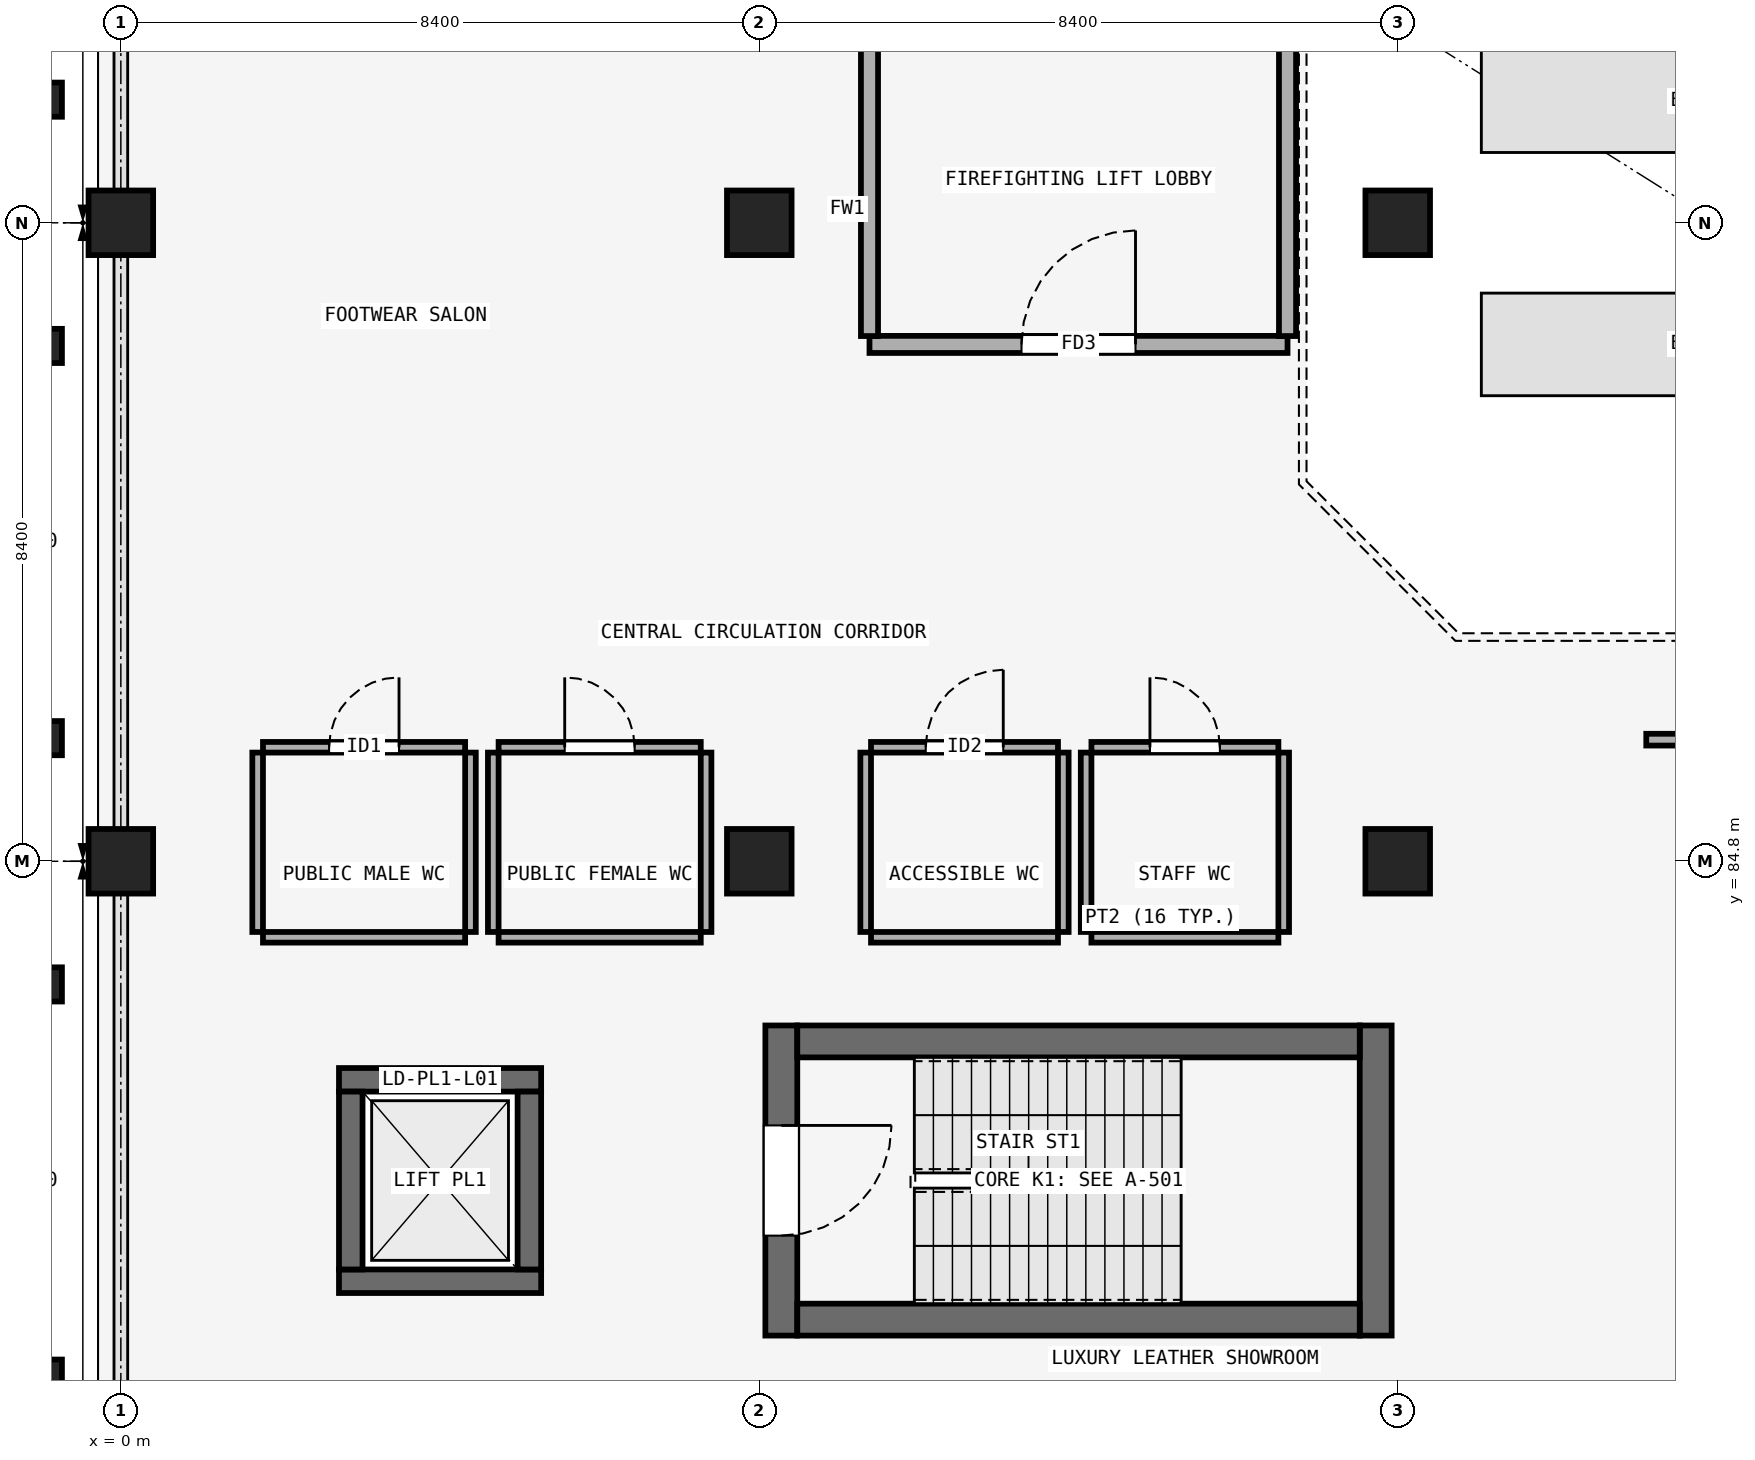
"""IFC4 building model, lengths in metres.
Left out: names, types, materials, properties, quantities, classifications, styles, units other than length and angle.
Written with IfcOpenShell. Run it as: python <this file> out.ifc"""

import sys

from ifc_helpers import new_model, si_unit, direction, frame, frame_2d, origin, origin_2d, place, context, subcontext, project, spatial, rectangle, extrude, element, fill, save


model = new_model("IFC4")
c1 = context("Model", 3, precision=1e-05, world=origin(), true_north=direction((0.0, 1.0)))
c2 = subcontext(c1, "Body", "Model", "MODEL_VIEW")
j1 = project(units=[si_unit("LENGTHUNIT", "METRE"), si_unit("PLANEANGLEUNIT", "RADIAN")], contexts=[c1])
p1 = place(None, origin())
s1 = spatial("IfcSite", under=j1, at=p1, CompositionType="ELEMENT")
p2 = place(p1, origin())
s2 = spatial("IfcBuilding", under=s1, at=p2, CompositionType="ELEMENT")
p3 = place(p2, frame((0.0, 0.0, 5.4)))
s3 = spatial("IfcBuildingStorey", under=s2, at=p3, CompositionType="ELEMENT", Elevation=5.4)
for number, where, z_axis, x_axis in (
    (1, (0.0, 84.8, 0.0), (0.0, 0.0, 1.0), (1.0, 0.0, 0.0)),
    (2, (8.4, 84.8, 0.0), (0.0, 0.0, 1.0), (1.0, 0.0, 0.0)),
    (3, (16.8, 84.8, 0.0), (0.0, 0.0, 1.0), (1.0, 0.0, 0.0)),
    (4, (0.0, 93.2, 0.0), (0.0, 0.0, 1.0), (1.0, 0.0, 0.0)),
    (5, (8.4, 93.2, 0.0), (0.0, 0.0, 1.0), (1.0, 0.0, 0.0)),
    (6, (16.8, 93.2, 0.0), (0.0, 0.0, 1.0), (1.0, 0.0, 0.0)),
):
    element("IfcColumn", number, at=place(p3, frame(where, z_axis=z_axis, x_axis=x_axis)), inside=s3, PredefinedType="COLUMN", context=c2, shape_type="SweptSolid", body=[
        extrude(rectangle(XDim=0.85, YDim=0.85, at=origin_2d()), origin(), (0.0, 0.0, 1.0), 4.5),
    ])
for number, where, z_axis, x_axis in (
    (7, (-1.05, 78.02, 0.0), (0.0, 0.0, 1.0), (0.0, 1.0, 0.0)),
    (8, (-1.05, 83.18, 0.0), (0.0, 0.0, 1.0), (0.0, 1.0, 0.0)),
    (9, (-1.05, 86.42, 0.0), (0.0, 0.0, 1.0), (0.0, 1.0, 0.0)),
    (10, (-1.05, 91.58, 0.0), (0.0, 0.0, 1.0), (0.0, 1.0, 0.0)),
    (11, (-1.05, 94.82, 0.0), (0.0, 0.0, 1.0), (0.0, 1.0, 0.0)),
):
    element("IfcColumn", number, at=place(p3, frame(where, z_axis=z_axis, x_axis=x_axis)), inside=s3, PredefinedType="PILASTER", context=c2, shape_type="SweptSolid", body=[
        extrude(rectangle(XDim=0.45, YDim=0.55, at=origin_2d()), origin(), (0.0, 0.0, 1.0), 4.5),
    ])
p4 = place(p3, frame((8.69, 82.64, 0.0), z_axis=(0.0, 0.0, 1.0), x_axis=(0.0, -1.0, 0.0)))
e12 = element("IfcWall", 12, at=p4, inside=s3, PredefinedType="SHEAR", context=c2, shape_type="SweptSolid", body=[
    extrude(rectangle(XDim=4.08, YDim=0.42, at=frame_2d((2.04, 0.0))), origin(), (0.0, 0.0, 1.0), 4.2),
])
p5 = place(p4, frame((1.315, 0.0, 0.0)))
e13 = element("IfcOpeningElement", 13, at=p5, cuts=e12, PredefinedType="OPENING", context=c2, shape_type="SweptSolid", body=[
    extrude(rectangle(XDim=1.45, YDim=2.2, at=frame_2d((0.725, 1.1))), frame((0.0, 0.22, 0.0), z_axis=(0.0, -1.0, 0.0), x_axis=(1.0, 0.0, 0.0)), (0.0, 0.0, 1.0), 0.44),
])
p6 = place(p3, frame((16.51, 78.56, 0.0), z_axis=(0.0, 0.0, 1.0), x_axis=(0.0, 1.0, 0.0)))
e14 = element("IfcWall", 14, at=p6, inside=s3, PredefinedType="SHEAR", context=c2, shape_type="SweptSolid", body=[
    extrude(rectangle(XDim=4.08, YDim=0.42, at=frame_2d((2.04, 0.0))), origin(), (0.0, 0.0, 1.0), 4.2),
])
for number, where, z_axis, x_axis in (
    (15, (8.9, 78.77, 0.0), (0.0, 0.0, 1.0), (1.0, 0.0, 0.0)),
    (16, (8.9, 82.43, 0.0), (0.0, 0.0, 1.0), (1.0, 0.0, 0.0)),
):
    element("IfcWall", number, at=place(p3, frame(where, z_axis=z_axis, x_axis=x_axis)), inside=s3, PredefinedType="SHEAR", context=c2, shape_type="SweptSolid", body=[
        extrude(rectangle(XDim=7.4, YDim=0.42, at=frame_2d((3.7, 0.0))), origin(), (0.0, 0.0, 1.0), 4.2),
    ])
p7 = place(p3, frame((2.87, 79.275, 0.0), z_axis=(0.0, 0.0, 1.0), x_axis=(1.0, 0.0, 0.0)))
e17 = element("IfcWall", 17, at=p7, inside=s3, PredefinedType="SHEAR", context=c2, shape_type="SweptSolid", body=[
    extrude(rectangle(XDim=2.66, YDim=0.31, at=frame_2d((1.33, 0.0))), origin(), (0.0, 0.0, 1.0), 4.2),
])
p8 = place(p3, frame((2.87, 81.925, 0.0), z_axis=(0.0, 0.0, 1.0), x_axis=(1.0, 0.0, 0.0)))
e18 = element("IfcWall", 18, at=p8, inside=s3, PredefinedType="SHEAR", context=c2, shape_type="SweptSolid", body=[
    extrude(rectangle(XDim=2.66, YDim=0.31, at=frame_2d((1.33, 0.0))), origin(), (0.0, 0.0, 1.0), 4.2),
])
p9 = place(p8, frame((0.78, 0.0, 0.0)))
e19 = element("IfcOpeningElement", 19, at=p9, cuts=e18, PredefinedType="OPENING", context=c2, shape_type="SweptSolid", body=[
    extrude(rectangle(XDim=1.1, YDim=2.2, at=frame_2d((0.55, 1.1))), frame((0.0, 0.165, 0.0), z_axis=(0.0, -1.0, 0.0), x_axis=(1.0, 0.0, 0.0)), (0.0, 0.0, 1.0), 0.33),
])
for number, where, z_axis, x_axis in (
    (20, (3.025, 79.43, 0.0), (0.0, 0.0, 1.0), (0.0, 1.0, 0.0)),
    (21, (5.375, 79.43, 0.0), (0.0, 0.0, 1.0), (0.0, 1.0, 0.0)),
):
    element("IfcWall", number, at=place(p3, frame(where, z_axis=z_axis, x_axis=x_axis)), inside=s3, PredefinedType="SHEAR", context=c2, shape_type="SweptSolid", body=[
        extrude(rectangle(XDim=2.34, YDim=0.31, at=frame_2d((1.17, 0.0))), origin(), (0.0, 0.0, 1.0), 4.2),
    ])
p10 = place(p3, frame((9.85, 91.6, 0.0), z_axis=(0.0, 0.0, 1.0), x_axis=(1.0, 0.0, 0.0)))
e22 = element("IfcWall", 22, at=p10, inside=s3, PredefinedType="PARTITIONING", context=c2, shape_type="SweptSolid", body=[
    extrude(rectangle(XDim=5.5, YDim=0.225, at=frame_2d((2.75, 0.0))), origin(), (0.0, 0.0, 1.0), 4.2),
])
p11 = place(p10, frame((2.0, 0.0, 0.0)))
e23 = element("IfcOpeningElement", 23, at=p11, cuts=e22, PredefinedType="OPENING", context=c2, shape_type="SweptSolid", body=[
    extrude(rectangle(XDim=1.5, YDim=2.25, at=frame_2d((0.75, 1.125))), frame((0.0, 0.123, 0.0), z_axis=(0.0, -1.0, 0.0), x_axis=(1.0, 0.0, 0.0)), (0.0, 0.0, 1.0), 0.245),
])
for number, where, z_axis, x_axis in (
    (24, (9.85, 91.71, 0.0), (0.0, 0.0, 1.0), (0.0, 1.0, 0.0)),
    (25, (15.35, 91.71, 0.0), (0.0, 0.0, 1.0), (0.0, 1.0, 0.0)),
):
    element("IfcWall", number, at=place(p3, frame(where, z_axis=z_axis, x_axis=x_axis)), inside=s3, PredefinedType="PARTITIONING", context=c2, shape_type="SweptSolid", body=[
        extrude(rectangle(XDim=4.53, YDim=0.225, at=frame_2d((2.265, 0.0))), origin(), (0.0, 0.0, 1.0), 3.5),
    ])
p12 = place(p3, frame((1.87, 86.3, 0.0), z_axis=(0.0, 0.0, 1.0), x_axis=(1.0, 0.0, 0.0)))
e26 = element("IfcWall", 26, at=p12, inside=s3, PredefinedType="PARTITIONING", context=c2, shape_type="SweptSolid", body=[
    extrude(rectangle(XDim=2.66, YDim=0.14, at=frame_2d((1.33, 0.0))), origin(), (0.0, 0.0, 1.0), 4.2),
])
p13 = place(p12, frame((0.87, 0.0, 0.0)))
e27 = element("IfcOpeningElement", 27, at=p13, cuts=e26, PredefinedType="OPENING", context=c2, shape_type="SweptSolid", body=[
    extrude(rectangle(XDim=0.92, YDim=2.12, at=frame_2d((0.46, 1.06))), frame((0.0, 0.08, 0.0), z_axis=(0.0, -1.0, 0.0), x_axis=(1.0, 0.0, 0.0)), (0.0, 0.0, 1.0), 0.16),
])
p14 = place(p3, frame((1.87, 83.8, 0.0), z_axis=(0.0, 0.0, 1.0), x_axis=(1.0, 0.0, 0.0)))
e28 = element("IfcWall", 28, at=p14, inside=s3, PredefinedType="PARTITIONING", context=c2, shape_type="SweptSolid", body=[
    extrude(rectangle(XDim=2.66, YDim=0.14, at=frame_2d((1.33, 0.0))), origin(), (0.0, 0.0, 1.0), 4.2),
])
for number, where, z_axis, x_axis in (
    (29, (1.8, 83.87, 0.0), (0.0, 0.0, 1.0), (0.0, 1.0, 0.0)),
    (30, (4.6, 83.87, 0.0), (0.0, 0.0, 1.0), (0.0, 1.0, 0.0)),
):
    element("IfcWall", number, at=place(p3, frame(where, z_axis=z_axis, x_axis=x_axis)), inside=s3, PredefinedType="PARTITIONING", context=c2, shape_type="SweptSolid", body=[
        extrude(rectangle(XDim=2.36, YDim=0.14, at=frame_2d((1.18, 0.0))), origin(), (0.0, 0.0, 1.0), 3.45),
    ])
p15 = place(p3, frame((4.97, 86.3, 0.0), z_axis=(0.0, 0.0, 1.0), x_axis=(1.0, 0.0, 0.0)))
e31 = element("IfcWall", 31, at=p15, inside=s3, PredefinedType="PARTITIONING", context=c2, shape_type="SweptSolid", body=[
    extrude(rectangle(XDim=2.66, YDim=0.14, at=frame_2d((1.33, 0.0))), origin(), (0.0, 0.0, 1.0), 4.2),
])
p16 = place(p15, frame((0.87, 0.0, 0.0)))
e32 = element("IfcOpeningElement", 32, at=p16, cuts=e31, PredefinedType="OPENING", context=c2, shape_type="SweptSolid", body=[
    extrude(rectangle(XDim=0.92, YDim=2.12, at=frame_2d((0.46, 1.06))), frame((0.0, 0.08, 0.0), z_axis=(0.0, -1.0, 0.0), x_axis=(1.0, 0.0, 0.0)), (0.0, 0.0, 1.0), 0.16),
])
p17 = place(p3, frame((4.97, 83.8, 0.0), z_axis=(0.0, 0.0, 1.0), x_axis=(1.0, 0.0, 0.0)))
e33 = element("IfcWall", 33, at=p17, inside=s3, PredefinedType="PARTITIONING", context=c2, shape_type="SweptSolid", body=[
    extrude(rectangle(XDim=2.66, YDim=0.14, at=frame_2d((1.33, 0.0))), origin(), (0.0, 0.0, 1.0), 4.2),
])
for number, where, z_axis, x_axis in (
    (34, (4.9, 83.87, 0.0), (0.0, 0.0, 1.0), (0.0, 1.0, 0.0)),
    (35, (7.7, 83.87, 0.0), (0.0, 0.0, 1.0), (0.0, 1.0, 0.0)),
):
    element("IfcWall", number, at=place(p3, frame(where, z_axis=z_axis, x_axis=x_axis)), inside=s3, PredefinedType="PARTITIONING", context=c2, shape_type="SweptSolid", body=[
        extrude(rectangle(XDim=2.36, YDim=0.14, at=frame_2d((1.18, 0.0))), origin(), (0.0, 0.0, 1.0), 3.45),
    ])
p18 = place(p3, frame((9.87, 86.3, 0.0), z_axis=(0.0, 0.0, 1.0), x_axis=(1.0, 0.0, 0.0)))
e36 = element("IfcWall", 36, at=p18, inside=s3, PredefinedType="PARTITIONING", context=c2, shape_type="SweptSolid", body=[
    extrude(rectangle(XDim=2.46, YDim=0.14, at=frame_2d((1.23, 0.0))), origin(), (0.0, 0.0, 1.0), 4.2),
])
p19 = place(p18, frame((0.72, 0.0, 0.0)))
e37 = element("IfcOpeningElement", 37, at=p19, cuts=e36, PredefinedType="OPENING", context=c2, shape_type="SweptSolid", body=[
    extrude(rectangle(XDim=1.02, YDim=2.15, at=frame_2d((0.51, 1.075))), frame((0.0, 0.08, 0.0), z_axis=(0.0, -1.0, 0.0), x_axis=(1.0, 0.0, 0.0)), (0.0, 0.0, 1.0), 0.16),
])
p20 = place(p3, frame((9.87, 83.8, 0.0), z_axis=(0.0, 0.0, 1.0), x_axis=(1.0, 0.0, 0.0)))
e38 = element("IfcWall", 38, at=p20, inside=s3, PredefinedType="PARTITIONING", context=c2, shape_type="SweptSolid", body=[
    extrude(rectangle(XDim=2.46, YDim=0.14, at=frame_2d((1.23, 0.0))), origin(), (0.0, 0.0, 1.0), 4.2),
])
for number, where, z_axis, x_axis in (
    (39, (9.8, 83.87, 0.0), (0.0, 0.0, 1.0), (0.0, 1.0, 0.0)),
    (40, (12.4, 83.87, 0.0), (0.0, 0.0, 1.0), (0.0, 1.0, 0.0)),
):
    element("IfcWall", number, at=place(p3, frame(where, z_axis=z_axis, x_axis=x_axis)), inside=s3, PredefinedType="PARTITIONING", context=c2, shape_type="SweptSolid", body=[
        extrude(rectangle(XDim=2.36, YDim=0.14, at=frame_2d((1.18, 0.0))), origin(), (0.0, 0.0, 1.0), 3.45),
    ])
p21 = place(p3, frame((12.77, 86.3, 0.0), z_axis=(0.0, 0.0, 1.0), x_axis=(1.0, 0.0, 0.0)))
e41 = element("IfcWall", 41, at=p21, inside=s3, PredefinedType="PARTITIONING", context=c2, shape_type="SweptSolid", body=[
    extrude(rectangle(XDim=2.46, YDim=0.14, at=frame_2d((1.23, 0.0))), origin(), (0.0, 0.0, 1.0), 4.2),
])
p22 = place(p21, frame((0.77, 0.0, 0.0)))
e42 = element("IfcOpeningElement", 42, at=p22, cuts=e41, PredefinedType="OPENING", context=c2, shape_type="SweptSolid", body=[
    extrude(rectangle(XDim=0.92, YDim=2.12, at=frame_2d((0.46, 1.06))), frame((0.0, 0.08, 0.0), z_axis=(0.0, -1.0, 0.0), x_axis=(1.0, 0.0, 0.0)), (0.0, 0.0, 1.0), 0.16),
])
p23 = place(p3, frame((12.77, 83.8, 0.0), z_axis=(0.0, 0.0, 1.0), x_axis=(1.0, 0.0, 0.0)))
e43 = element("IfcWall", 43, at=p23, inside=s3, PredefinedType="PARTITIONING", context=c2, shape_type="SweptSolid", body=[
    extrude(rectangle(XDim=2.46, YDim=0.14, at=frame_2d((1.23, 0.0))), origin(), (0.0, 0.0, 1.0), 4.2),
])
for number, where, z_axis, x_axis in (
    (44, (12.7, 83.87, 0.0), (0.0, 0.0, 1.0), (0.0, 1.0, 0.0)),
    (45, (15.3, 83.87, 0.0), (0.0, 0.0, 1.0), (0.0, 1.0, 0.0)),
):
    element("IfcWall", number, at=place(p3, frame(where, z_axis=z_axis, x_axis=x_axis)), inside=s3, PredefinedType="PARTITIONING", context=c2, shape_type="SweptSolid", body=[
        extrude(rectangle(XDim=2.36, YDim=0.14, at=frame_2d((1.18, 0.0))), origin(), (0.0, 0.0, 1.0), 3.45),
    ])
p24 = place(p3, frame((20.07, 86.4, 0.0), z_axis=(0.0, 0.0, 1.0), x_axis=(1.0, 0.0, 0.0)))
e46 = element("IfcWall", 46, at=p24, inside=s3, PredefinedType="PARTITIONING", context=c2, shape_type="SweptSolid", body=[
    extrude(rectangle(XDim=6.91, YDim=0.155, at=frame_2d((3.455, 0.0))), origin(), (0.0, 0.0, 1.0), 4.2),
])
p25 = place(p5, origin())
e47 = element("IfcDoor", 47, at=p25, inside=s3, OperationType="SINGLE_SWING_LEFT", PredefinedType="DOOR", context=c2, shape_type="SweptSolid", body=[
    extrude(rectangle(XDim=1.45, YDim=2.2, at=frame_2d((0.725, 1.1))), frame((0.0, 0.025, 0.0), z_axis=(0.0, -1.0, 0.0), x_axis=(1.0, 0.0, 0.0)), (0.0, 0.0, 1.0), 0.05),
])
fill(e13, e47)
p26 = place(p9, origin())
e48 = element("IfcDoor", 48, at=p26, inside=s3, OperationType="SLIDING_TO_LEFT", PredefinedType="DOOR", context=c2, shape_type="SweptSolid", body=[
    extrude(rectangle(XDim=1.1, YDim=2.2, at=frame_2d((0.55, 1.1))), frame((0.0, 0.025, 0.0), z_axis=(0.0, -1.0, 0.0), x_axis=(1.0, 0.0, 0.0)), (0.0, 0.0, 1.0), 0.05),
])
fill(e19, e48)
p27 = place(p11, origin())
e49 = element("IfcDoor", 49, at=p27, inside=s3, OperationType="SINGLE_SWING_RIGHT", PredefinedType="DOOR", context=c2, shape_type="SweptSolid", body=[
    extrude(rectangle(XDim=1.5, YDim=2.25, at=frame_2d((0.75, 1.125))), frame((0.0, 0.025, 0.0), z_axis=(0.0, -1.0, 0.0), x_axis=(1.0, 0.0, 0.0)), (0.0, 0.0, 1.0), 0.05),
])
fill(e23, e49)
p28 = place(p13, origin())
e50 = element("IfcDoor", 50, at=p28, inside=s3, OperationType="SINGLE_SWING_RIGHT", PredefinedType="DOOR", context=c2, shape_type="SweptSolid", body=[
    extrude(rectangle(XDim=0.92, YDim=2.12, at=frame_2d((0.46, 1.06))), frame((0.0, 0.025, 0.0), z_axis=(0.0, -1.0, 0.0), x_axis=(1.0, 0.0, 0.0)), (0.0, 0.0, 1.0), 0.05),
])
fill(e27, e50)
p29 = place(p16, origin())
e51 = element("IfcDoor", 51, at=p29, inside=s3, OperationType="SINGLE_SWING_LEFT", PredefinedType="DOOR", context=c2, shape_type="SweptSolid", body=[
    extrude(rectangle(XDim=0.92, YDim=2.12, at=frame_2d((0.46, 1.06))), frame((0.0, 0.025, 0.0), z_axis=(0.0, -1.0, 0.0), x_axis=(1.0, 0.0, 0.0)), (0.0, 0.0, 1.0), 0.05),
])
fill(e32, e51)
p30 = place(p19, origin())
e52 = element("IfcDoor", 52, at=p30, inside=s3, OperationType="SINGLE_SWING_RIGHT", PredefinedType="DOOR", context=c2, shape_type="SweptSolid", body=[
    extrude(rectangle(XDim=1.02, YDim=2.15, at=frame_2d((0.51, 1.075))), frame((0.0, 0.025, 0.0), z_axis=(0.0, -1.0, 0.0), x_axis=(1.0, 0.0, 0.0)), (0.0, 0.0, 1.0), 0.05),
])
fill(e37, e52)
p31 = place(p22, origin())
e53 = element("IfcDoor", 53, at=p31, inside=s3, OperationType="SINGLE_SWING_LEFT", PredefinedType="DOOR", context=c2, shape_type="SweptSolid", body=[
    extrude(rectangle(XDim=0.92, YDim=2.12, at=frame_2d((0.46, 1.06))), frame((0.0, 0.025, 0.0), z_axis=(0.0, -1.0, 0.0), x_axis=(1.0, 0.0, 0.0)), (0.0, 0.0, 1.0), 0.05),
])
fill(e42, e53)
save(model, sys.argv[1])
